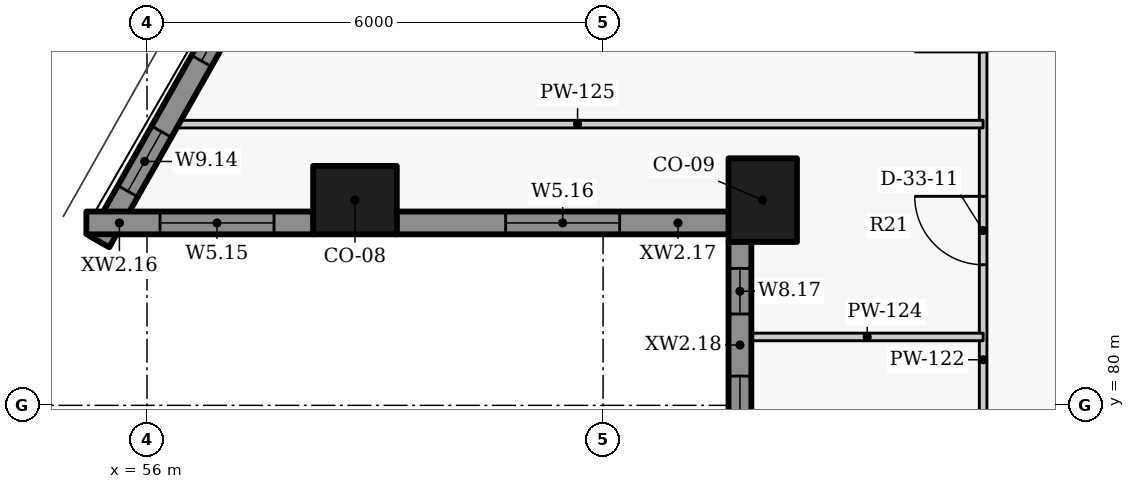
"""IFC4 building model, lengths in metres.
Left out: names, types, materials, properties, quantities, classifications, styles, units other than length and angle.
Written with IfcOpenShell. Run it as: python <this file> out.ifc"""

import sys

from ifc_helpers import new_model, si_unit, direction, frame, frame_2d, origin, origin_2d, place, context, subcontext, project, spatial, rectangle, extrude, element, fill, save


model = new_model("IFC4")
c1 = context("Model", 3, precision=1e-05, world=origin(), true_north=direction((0.0, 1.0)))
c2 = subcontext(c1, "Body", "Model", "MODEL_VIEW")
j1 = project(units=[si_unit("LENGTHUNIT", "METRE"), si_unit("PLANEANGLEUNIT", "RADIAN")], contexts=[c1])
p1 = place(None, origin())
s1 = spatial("IfcSite", under=j1, at=p1, CompositionType="ELEMENT")
p2 = place(p1, origin())
s2 = spatial("IfcBuilding", under=s1, at=p2, CompositionType="ELEMENT")
p3 = place(p2, frame((0.0, 0.0, 239.4)))
s3 = spatial("IfcBuildingStorey", under=s2, at=p3, CompositionType="ELEMENT", Elevation=239.4)
for number, where, z_axis, x_axis in (
    (1, (58.736, 82.7, 0.0), (0.0, 0.0, 1.0), (1.0, 0.0, 0.0)),
    (2, (64.101, 82.7, 0.0), (0.0, 0.0, 1.0), (0.0, -1.0, 0.0)),
):
    element("IfcColumn", number, at=place(p3, frame(where, z_axis=z_axis, x_axis=x_axis)), inside=s3, PredefinedType="COLUMN", context=c2, shape_type="SweptSolid", body=[
        extrude(rectangle(XDim=1.1, YDim=0.9, at=origin_2d()), origin(), (0.0, 0.0, 1.0), 3.3),
    ])
p4 = place(p3, frame((58.048, 86.886, 0.0), z_axis=(0.0, 0.0, 1.0), x_axis=(-0.492080931903, -0.870549456641, 0.0)))
e3 = element("IfcWall", 3, at=p4, inside=s3, PredefinedType="SOLIDWALL", context=c2, shape_type="SweptSolid", body=[
    extrude(rectangle(XDim=5.437, YDim=0.3, at=frame_2d((2.718, 0.0))), origin(), (0.0, 0.0, 1.0), 2.425),
])
p5 = place(p4, frame((1.206, 0.0, 0.9)))
e4 = element("IfcOpeningElement", 4, at=p5, cuts=e3, PredefinedType="OPENING", context=c2, shape_type="SweptSolid", body=[
    extrude(rectangle(XDim=1.5, YDim=1.1, at=frame_2d((0.75, 0.55))), frame((0.0, 0.16, 0.0), z_axis=(0.0, -1.0, 0.0), x_axis=(1.0, 0.0, 0.0)), (0.0, 0.0, 1.0), 0.32),
])
p6 = place(p4, frame((3.775, 0.0, 0.9)))
e5 = element("IfcOpeningElement", 5, at=p6, cuts=e3, PredefinedType="OPENING", context=c2, shape_type="SweptSolid", body=[
    extrude(rectangle(XDim=0.9, YDim=1.1, at=frame_2d((0.45, 0.55))), frame((0.0, 0.16, 0.0), z_axis=(0.0, -1.0, 0.0), x_axis=(1.0, 0.0, 0.0)), (0.0, 0.0, 1.0), 0.32),
])
p7 = place(p3, frame((55.202, 82.4, 0.0), z_axis=(0.0, 0.0, 1.0), x_axis=(1.0, 0.0, 0.0)))
e6 = element("IfcWall", 6, at=p7, inside=s3, PredefinedType="SOLIDWALL", context=c2, shape_type="SweptSolid", body=[
    extrude(rectangle(XDim=2.988, YDim=0.3, at=frame_2d((1.494, 0.0))), origin(), (0.0, 0.0, 1.0), 2.425),
])
p8 = place(p7, frame((0.969, 0.0, 0.9)))
e7 = element("IfcOpeningElement", 7, at=p8, cuts=e6, PredefinedType="OPENING", context=c2, shape_type="SweptSolid", body=[
    extrude(rectangle(XDim=1.5, YDim=1.1, at=frame_2d((0.75, 0.55))), frame((0.0, 0.16, 0.0), z_axis=(0.0, -1.0, 0.0), x_axis=(1.0, 0.0, 0.0)), (0.0, 0.0, 1.0), 0.32),
])
p9 = place(p3, frame((59.282, 82.4, 0.0), z_axis=(0.0, 0.0, 1.0), x_axis=(1.0, 0.0, 0.0)))
e8 = element("IfcWall", 8, at=p9, inside=s3, PredefinedType="SOLIDWALL", context=c2, shape_type="SweptSolid", body=[
    extrude(rectangle(XDim=4.373, YDim=0.3, at=frame_2d((2.186, 0.0))), origin(), (0.0, 0.0, 1.0), 2.425),
])
p10 = place(p9, frame((1.436, 0.0, 0.9)))
e9 = element("IfcOpeningElement", 9, at=p10, cuts=e8, PredefinedType="OPENING", context=c2, shape_type="SweptSolid", body=[
    extrude(rectangle(XDim=1.5, YDim=1.1, at=frame_2d((0.75, 0.55))), frame((0.0, 0.16, 0.0), z_axis=(0.0, -1.0, 0.0), x_axis=(1.0, 0.0, 0.0)), (0.0, 0.0, 1.0), 0.32),
])
p11 = place(p3, frame((63.801, 82.154, 0.0), z_axis=(0.0, 0.0, 1.0), x_axis=(0.0, -1.0, 0.0)))
e10 = element("IfcWall", 10, at=p11, inside=s3, PredefinedType="SOLIDWALL", context=c2, shape_type="SweptSolid", body=[
    extrude(rectangle(XDim=4.408, YDim=0.3, at=frame_2d((2.204, 0.0))), origin(), (0.0, 0.0, 1.0), 2.425),
])
p12 = place(p11, frame((0.352, 0.0, 0.9)))
e11 = element("IfcOpeningElement", 11, at=p12, cuts=e10, PredefinedType="OPENING", context=c2, shape_type="SweptSolid", body=[
    extrude(rectangle(XDim=0.6, YDim=1.1, at=frame_2d((0.3, 0.55))), frame((0.0, 0.16, 0.0), z_axis=(0.0, -1.0, 0.0), x_axis=(1.0, 0.0, 0.0)), (0.0, 0.0, 1.0), 0.32),
])
p13 = place(p11, frame((1.769, 0.0, 0.9)))
e12 = element("IfcOpeningElement", 12, at=p13, cuts=e10, PredefinedType="OPENING", context=c2, shape_type="SweptSolid", body=[
    extrude(rectangle(XDim=2.1, YDim=1.1, at=frame_2d((1.05, 0.55))), frame((0.0, 0.16, 0.0), z_axis=(0.0, -1.0, 0.0), x_axis=(1.0, 0.0, 0.0)), (0.0, 0.0, 1.0), 0.32),
])
p14 = place(p3, frame((67.0, 76.9, 0.0), z_axis=(0.0, 0.0, 1.0), x_axis=(0.0, 1.0, 0.0)))
e13 = element("IfcWall", 13, at=p14, inside=s3, PredefinedType="PARTITIONING", context=c2, shape_type="SweptSolid", body=[
    extrude(rectangle(XDim=9.6, YDim=0.1, at=frame_2d((4.8, 0.0))), origin(), (0.0, 0.0, 1.0), 3.025),
])
p15 = place(p14, frame((1.55, 0.0, 0.0)))
e14 = element("IfcOpeningElement", 14, at=p15, cuts=e13, PredefinedType="OPENING", context=c2, shape_type="SweptSolid", body=[
    extrude(rectangle(XDim=0.9, YDim=2.1, at=frame_2d((0.45, 1.05))), frame((0.0, 0.06, 0.0), z_axis=(0.0, -1.0, 0.0), x_axis=(1.0, 0.0, 0.0)), (0.0, 0.0, 1.0), 0.12),
])
p16 = place(p14, frame((4.95, 0.0, 0.0)))
e15 = element("IfcOpeningElement", 15, at=p16, cuts=e13, PredefinedType="OPENING", context=c2, shape_type="SweptSolid", body=[
    extrude(rectangle(XDim=0.9, YDim=2.1, at=frame_2d((0.45, 1.05))), frame((0.0, 0.06, 0.0), z_axis=(0.0, -1.0, 0.0), x_axis=(1.0, 0.0, 0.0)), (0.0, 0.0, 1.0), 0.12),
])
p17 = place(p14, frame((7.75, 0.0, 0.0)))
e16 = element("IfcOpeningElement", 16, at=p17, cuts=e13, PredefinedType="OPENING", context=c2, shape_type="SweptSolid", body=[
    extrude(rectangle(XDim=0.9, YDim=2.1, at=frame_2d((0.45, 1.05))), frame((0.0, 0.06, 0.0), z_axis=(0.0, -1.0, 0.0), x_axis=(1.0, 0.0, 0.0)), (0.0, 0.0, 1.0), 0.12),
])
p18 = place(p3, frame((63.95, 80.9, 0.0), z_axis=(0.0, 0.0, 1.0), x_axis=(1.0, 0.0, 0.0)))
e17 = element("IfcWall", 17, at=p18, inside=s3, PredefinedType="PARTITIONING", context=c2, shape_type="SweptSolid", body=[
    extrude(rectangle(XDim=3.05, YDim=0.1, at=frame_2d((1.525, 0.0))), origin(), (0.0, 0.0, 1.0), 2.405),
])
p19 = place(p3, frame((56.329, 83.7, 0.0), z_axis=(0.0, 0.0, 1.0), x_axis=(1.0, 0.0, 0.0)))
e18 = element("IfcWall", 18, at=p19, inside=s3, PredefinedType="PARTITIONING", context=c2, shape_type="SweptSolid", body=[
    extrude(rectangle(XDim=10.671, YDim=0.1, at=frame_2d((5.336, 0.0))), origin(), (0.0, 0.0, 1.0), 2.405),
])
p20 = place(p5, origin())
e19 = element("IfcWindow", 19, at=p20, inside=s3, PartitioningType="SINGLE_PANEL", PredefinedType="WINDOW", context=c2, shape_type="SweptSolid", body=[
    extrude(rectangle(XDim=1.5, YDim=1.1, at=frame_2d((0.75, 0.55))), frame((0.0, 0.03, 0.0), z_axis=(0.0, -1.0, 0.0), x_axis=(1.0, 0.0, 0.0)), (0.0, 0.0, 1.0), 0.06),
])
fill(e4, e19)
p21 = place(p6, origin())
e20 = element("IfcWindow", 20, at=p21, inside=s3, PartitioningType="SINGLE_PANEL", PredefinedType="WINDOW", context=c2, shape_type="SweptSolid", body=[
    extrude(rectangle(XDim=0.9, YDim=1.1, at=frame_2d((0.45, 0.55))), frame((0.0, 0.03, 0.0), z_axis=(0.0, -1.0, 0.0), x_axis=(1.0, 0.0, 0.0)), (0.0, 0.0, 1.0), 0.06),
])
fill(e5, e20)
p22 = place(p8, origin())
e21 = element("IfcWindow", 21, at=p22, inside=s3, PartitioningType="SINGLE_PANEL", PredefinedType="WINDOW", context=c2, shape_type="SweptSolid", body=[
    extrude(rectangle(XDim=1.5, YDim=1.1, at=frame_2d((0.75, 0.55))), frame((0.0, 0.03, 0.0), z_axis=(0.0, -1.0, 0.0), x_axis=(1.0, 0.0, 0.0)), (0.0, 0.0, 1.0), 0.06),
])
fill(e7, e21)
p23 = place(p10, origin())
e22 = element("IfcWindow", 22, at=p23, inside=s3, PartitioningType="SINGLE_PANEL", PredefinedType="WINDOW", context=c2, shape_type="SweptSolid", body=[
    extrude(rectangle(XDim=1.5, YDim=1.1, at=frame_2d((0.75, 0.55))), frame((0.0, 0.03, 0.0), z_axis=(0.0, -1.0, 0.0), x_axis=(1.0, 0.0, 0.0)), (0.0, 0.0, 1.0), 0.06),
])
fill(e9, e22)
p24 = place(p12, origin())
e23 = element("IfcWindow", 23, at=p24, inside=s3, PartitioningType="SINGLE_PANEL", PredefinedType="WINDOW", context=c2, shape_type="SweptSolid", body=[
    extrude(rectangle(XDim=0.6, YDim=1.1, at=frame_2d((0.3, 0.55))), frame((0.0, 0.03, 0.0), z_axis=(0.0, -1.0, 0.0), x_axis=(1.0, 0.0, 0.0)), (0.0, 0.0, 1.0), 0.06),
])
fill(e11, e23)
p25 = place(p13, origin())
e24 = element("IfcWindow", 24, at=p25, inside=s3, PartitioningType="SINGLE_PANEL", PredefinedType="WINDOW", context=c2, shape_type="SweptSolid", body=[
    extrude(rectangle(XDim=2.1, YDim=1.1, at=frame_2d((1.05, 0.55))), frame((0.0, 0.03, 0.0), z_axis=(0.0, -1.0, 0.0), x_axis=(1.0, 0.0, 0.0)), (0.0, 0.0, 1.0), 0.06),
])
fill(e12, e24)
p26 = place(p16, origin())
e25 = element("IfcDoor", 25, at=p26, inside=s3, OperationType="SINGLE_SWING_RIGHT", PredefinedType="DOOR", context=c2, shape_type="SweptSolid", body=[
    extrude(rectangle(XDim=0.9, YDim=2.1, at=frame_2d((0.45, 1.05))), frame((0.0, 0.025, 0.0), z_axis=(0.0, -1.0, 0.0), x_axis=(1.0, 0.0, 0.0)), (0.0, 0.0, 1.0), 0.05),
])
fill(e15, e25)
save(model, sys.argv[1])
